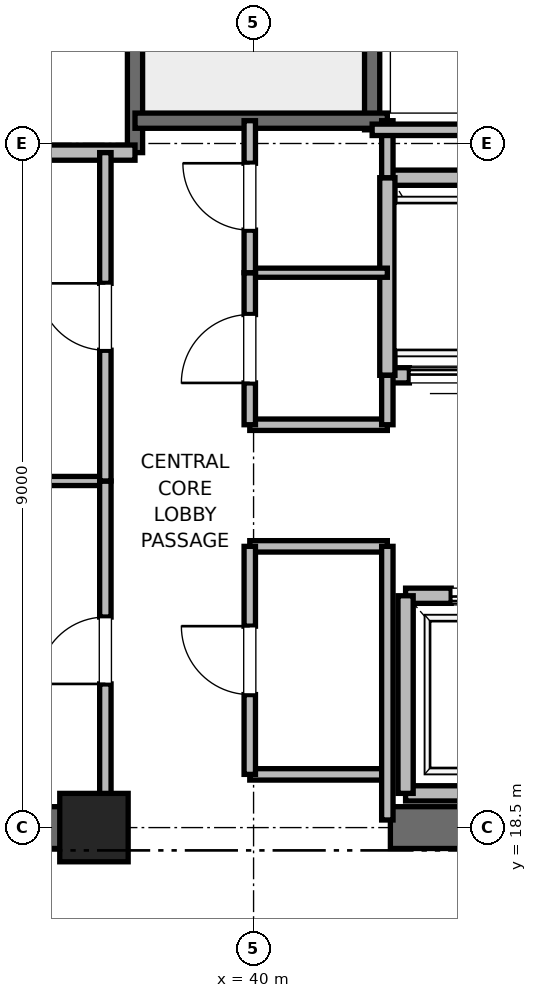
"""IFC4 building model, lengths in metres.
Left out: names, types, materials, properties, quantities, classifications, styles, units other than length and angle.
Written with IfcOpenShell. Run it as: python <this file> out.ifc"""

import sys

from ifc_helpers import new_model, si_unit, direction, frame, frame_2d, origin, origin_2d, place, context, subcontext, project, spatial, rectangle, extrude, element, fill, save


model = new_model("IFC4")
c1 = context("Model", 3, precision=1e-05, world=origin(), true_north=direction((0.0, 1.0)))
c2 = subcontext(c1, "Body", "Model", "MODEL_VIEW")
j1 = project(units=[si_unit("LENGTHUNIT", "METRE"), si_unit("PLANEANGLEUNIT", "RADIAN")], contexts=[c1])
p1 = place(None, origin())
s1 = spatial("IfcSite", under=j1, at=p1, CompositionType="ELEMENT")
p2 = place(p1, origin())
s2 = spatial("IfcBuilding", under=s1, at=p2, CompositionType="ELEMENT")
p3 = place(p2, frame((0.0, 0.0, 189.4)))
s3 = spatial("IfcBuildingStorey", under=s2, at=p3, CompositionType="ELEMENT", Elevation=189.4)
p4 = place(p3, frame((37.9, 18.5, 0.0), z_axis=(0.0, 0.0, 1.0), x_axis=(1.0, 0.0, 0.0)))
e1 = element("IfcColumn", 1, at=p4, inside=s3, PredefinedType="PILASTER", context=c2, shape_type="SweptSolid", body=[
    extrude(rectangle(XDim=0.9, YDim=0.9, at=origin_2d()), origin(), (0.0, 0.0, 1.0), 5.4),
])
for number, where, z_axis, x_axis in (
    (2, (29.0, 18.5, 0.0), (0.0, 0.0, 1.0), (1.0, 0.0, 0.0)),
    (3, (41.8, 18.5, 0.0), (0.0, 0.0, 1.0), (1.0, 0.0, 0.0)),
):
    element("IfcWall", number, at=place(p3, frame(where, z_axis=z_axis, x_axis=x_axis)), inside=s3, PredefinedType="SHEAR", context=c2, shape_type="SweptSolid", body=[
        extrude(rectangle(XDim=9.2, YDim=0.55, at=frame_2d((4.6, 0.0))), origin(), (0.0, 0.0, 1.0), 5.1),
    ])
p5 = place(p3, frame((38.44, 27.38, 0.0), z_axis=(0.0, 0.0, 1.0), x_axis=(0.0, 1.0, 0.0)))
e4 = element("IfcWall", 4, at=p5, inside=s3, PredefinedType="SOLIDWALL", context=c2, shape_type="SweptSolid", body=[
    extrude(rectangle(XDim=8.87, YDim=0.2, at=frame_2d((4.435, 0.0))), origin(), (0.0, 0.0, 1.0), 5.1),
])
p6 = place(p3, frame((41.56, 27.68, 0.0), z_axis=(0.0, 0.0, 1.0), x_axis=(0.0, 1.0, 0.0)))
e5 = element("IfcWall", 5, at=p6, inside=s3, PredefinedType="SOLIDWALL", context=c2, shape_type="SweptSolid", body=[
    extrude(rectangle(XDim=8.57, YDim=0.2, at=frame_2d((4.285, 0.0))), origin(), (0.0, 0.0, 1.0), 5.1),
])
p7 = place(p3, frame((38.44, 27.8, 0.0), z_axis=(0.0, 0.0, 1.0), x_axis=(1.0, 0.0, 0.0)))
e6 = element("IfcWall", 6, at=p7, inside=s3, PredefinedType="SOLIDWALL", context=c2, shape_type="SweptSolid", body=[
    extrude(rectangle(XDim=3.32, YDim=0.2, at=frame_2d((1.66, 0.0))), origin(), (0.0, 0.0, 1.0), 5.1),
])
p8 = place(p3, frame((32.82, 27.38, 0.0), z_axis=(0.0, 0.0, 1.0), x_axis=(1.0, 0.0, 0.0)))
e7 = element("IfcWall", 7, at=p8, inside=s3, PredefinedType="PARTITIONING", context=c2, shape_type="SweptSolid", body=[
    extrude(rectangle(XDim=5.62, YDim=0.2, at=frame_2d((2.81, 0.0))), origin(), (0.0, 0.0, 1.0), 5.1),
])
p9 = place(p3, frame((42.0, 18.95, 0.0), z_axis=(0.0, 0.0, 1.0), x_axis=(1.0, 0.0, 0.0)))
e8 = element("IfcWall", 8, at=p9, inside=s3, PredefinedType="SOLIDWALL", context=c2, shape_type="SweptSolid", body=[
    extrude(rectangle(XDim=2.3, YDim=0.2, at=frame_2d((1.15, 0.0))), origin(), (0.0, 0.0, 1.0), 4.08),
])
p10 = place(p3, frame((44.3, 21.55, 0.0), z_axis=(0.0, 0.0, 1.0), x_axis=(-1.0, 0.0, 0.0)))
e9 = element("IfcWall", 9, at=p10, inside=s3, PredefinedType="SOLIDWALL", context=c2, shape_type="SweptSolid", body=[
    extrude(rectangle(XDim=2.3, YDim=0.2, at=frame_2d((1.15, 0.0))), origin(), (0.0, 0.0, 1.0), 5.1),
])
p11 = place(p10, frame((0.6, 0.0, 0.0)))
e10 = element("IfcOpeningElement", 10, at=p11, cuts=e9, PredefinedType="OPENING", context=c2, shape_type="SweptSolid", body=[
    extrude(rectangle(XDim=1.1, YDim=2.2, at=frame_2d((0.55, 1.1))), frame((0.0, 0.1, 0.0), z_axis=(0.0, -1.0, 0.0), x_axis=(1.0, 0.0, 0.0)), (0.0, 0.0, 1.0), 0.2),
])
p12 = place(p3, frame((42.0, 21.55, 0.0), z_axis=(0.0, 0.0, 1.0), x_axis=(0.0, -1.0, 0.0)))
e11 = element("IfcWall", 11, at=p12, inside=s3, PredefinedType="SOLIDWALL", context=c2, shape_type="SweptSolid", body=[
    extrude(rectangle(XDim=2.6, YDim=0.2, at=frame_2d((1.3, 0.0))), origin(), (0.0, 0.0, 1.0), 4.08),
])
p13 = place(p3, frame((41.76, 24.45, 0.0), z_axis=(0.0, 0.0, 1.0), x_axis=(1.0, 0.0, 0.0)))
e12 = element("IfcWall", 12, at=p13, inside=s3, PredefinedType="SOLIDWALL", context=c2, shape_type="SweptSolid", body=[
    extrude(rectangle(XDim=1.68, YDim=0.2, at=frame_2d((0.84, 0.0))), origin(), (0.0, 0.0, 1.0), 5.1),
])
p14 = place(p13, frame((0.29, 0.0, 0.0)))
e13 = element("IfcOpeningElement", 13, at=p14, cuts=e12, PredefinedType="OPENING", context=c2, shape_type="SweptSolid", body=[
    extrude(rectangle(XDim=1.1, YDim=2.2, at=frame_2d((0.55, 1.1))), frame((0.0, 0.1, 0.0), z_axis=(0.0, -1.0, 0.0), x_axis=(1.0, 0.0, 0.0)), (0.0, 0.0, 1.0), 0.2),
])
p15 = place(p3, frame((43.44, 27.05, 0.0), z_axis=(0.0, 0.0, 1.0), x_axis=(-1.0, 0.0, 0.0)))
e14 = element("IfcWall", 14, at=p15, inside=s3, PredefinedType="SOLIDWALL", context=c2, shape_type="SweptSolid", body=[
    extrude(rectangle(XDim=1.68, YDim=0.2, at=frame_2d((0.84, 0.0))), origin(), (0.0, 0.0, 1.0), 5.1),
])
p16 = place(p3, frame((41.76, 27.05, 0.0), z_axis=(0.0, 0.0, 1.0), x_axis=(0.0, -1.0, 0.0)))
e15 = element("IfcWall", 15, at=p16, inside=s3, PredefinedType="SOLIDWALL", context=c2, shape_type="SweptSolid", body=[
    extrude(rectangle(XDim=2.6, YDim=0.2, at=frame_2d((1.3, 0.0))), origin(), (0.0, 0.0, 1.0), 5.1),
])
for number, where, z_axis, x_axis in (
    (16, (39.95, 19.2, 0.0), (0.0, 0.0, 1.0), (1.0, 0.0, 0.0)),
    (17, (39.95, 22.2, 0.0), (0.0, 0.0, 1.0), (1.0, 0.0, 0.0)),
    (18, (39.95, 23.8, 0.0), (0.0, 0.0, 1.0), (1.0, 0.0, 0.0)),
):
    element("IfcWall", number, at=place(p3, frame(where, z_axis=z_axis, x_axis=x_axis)), inside=s3, PredefinedType="PARTITIONING", context=c2, shape_type="SweptSolid", body=[
        extrude(rectangle(XDim=1.81, YDim=0.15, at=frame_2d((0.905, 0.0))), origin(), (0.0, 0.0, 1.0), 2.85),
    ])
p17 = place(p3, frame((39.95, 25.8, 0.0), z_axis=(0.0, 0.0, 1.0), x_axis=(1.0, 0.0, 0.0)))
e19 = element("IfcWall", 19, at=p17, inside=s3, PredefinedType="PARTITIONING", context=c2, shape_type="SweptSolid", body=[
    extrude(rectangle(XDim=1.81, YDim=0.12, at=frame_2d((0.905, 0.0))), origin(), (0.0, 0.0, 1.0), 2.85),
])
p18 = place(p3, frame((41.76, 18.6, 0.0), z_axis=(0.0, 0.0, 1.0), x_axis=(0.0, 1.0, 0.0)))
e20 = element("IfcWall", 20, at=p18, inside=s3, PredefinedType="PARTITIONING", context=c2, shape_type="SweptSolid", body=[
    extrude(rectangle(XDim=3.6, YDim=0.15, at=frame_2d((1.8, 0.0))), origin(), (0.0, 0.0, 1.0), 2.85),
])
p19 = place(p3, frame((41.76, 23.8, 0.0), z_axis=(0.0, 0.0, 1.0), x_axis=(0.0, 1.0, 0.0)))
e21 = element("IfcWall", 21, at=p19, inside=s3, PredefinedType="PARTITIONING", context=c2, shape_type="SweptSolid", body=[
    extrude(rectangle(XDim=0.65, YDim=0.15, at=frame_2d((0.325, 0.0))), origin(), (0.0, 0.0, 1.0), 2.85),
])
p20 = place(p3, frame((41.76, 27.05, 0.0), z_axis=(0.0, 0.0, 1.0), x_axis=(0.0, 1.0, 0.0)))
e22 = element("IfcWall", 22, at=p20, inside=s3, PredefinedType="PARTITIONING", context=c2, shape_type="SweptSolid", body=[
    extrude(rectangle(XDim=0.75, YDim=0.15, at=frame_2d((0.375, 0.0))), origin(), (0.0, 0.0, 1.0), 2.85),
])
p21 = place(p3, frame((39.95, 19.2, 0.0), z_axis=(0.0, 0.0, 1.0), x_axis=(0.0, 1.0, 0.0)))
e23 = element("IfcWall", 23, at=p21, inside=s3, PredefinedType="PARTITIONING", context=c2, shape_type="SweptSolid", body=[
    extrude(rectangle(XDim=3.0, YDim=0.15, at=frame_2d((1.5, 0.0))), origin(), (0.0, 0.0, 1.0), 2.85),
])
p22 = place(p21, frame((1.05, 0.0, 0.0)))
e24 = element("IfcOpeningElement", 24, at=p22, cuts=e23, PredefinedType="OPENING", context=c2, shape_type="SweptSolid", body=[
    extrude(rectangle(XDim=0.9, YDim=2.1, at=frame_2d((0.45, 1.05))), frame((0.0, 0.075, 0.0), z_axis=(0.0, -1.0, 0.0), x_axis=(1.0, 0.0, 0.0)), (0.0, 0.0, 1.0), 0.15),
])
p23 = place(p3, frame((39.95, 23.8, 0.0), z_axis=(0.0, 0.0, 1.0), x_axis=(0.0, 1.0, 0.0)))
e25 = element("IfcWall", 25, at=p23, inside=s3, PredefinedType="PARTITIONING", context=c2, shape_type="SweptSolid", body=[
    extrude(rectangle(XDim=2.0, YDim=0.15, at=frame_2d((1.0, 0.0))), origin(), (0.0, 0.0, 1.0), 2.85),
])
p24 = place(p23, frame((0.55, 0.0, 0.0)))
e26 = element("IfcOpeningElement", 26, at=p24, cuts=e25, PredefinedType="OPENING", context=c2, shape_type="SweptSolid", body=[
    extrude(rectangle(XDim=0.9, YDim=2.1, at=frame_2d((0.45, 1.05))), frame((0.0, 0.075, 0.0), z_axis=(0.0, -1.0, 0.0), x_axis=(1.0, 0.0, 0.0)), (0.0, 0.0, 1.0), 0.15),
])
p25 = place(p3, frame((39.95, 25.8, 0.0), z_axis=(0.0, 0.0, 1.0), x_axis=(0.0, 1.0, 0.0)))
e27 = element("IfcWall", 27, at=p25, inside=s3, PredefinedType="PARTITIONING", context=c2, shape_type="SweptSolid", body=[
    extrude(rectangle(XDim=2.0, YDim=0.15, at=frame_2d((1.0, 0.0))), origin(), (0.0, 0.0, 1.0), 2.85),
])
p26 = place(p25, frame((0.56, 0.0, 0.0)))
e28 = element("IfcOpeningElement", 28, at=p26, cuts=e27, PredefinedType="OPENING", context=c2, shape_type="SweptSolid", body=[
    extrude(rectangle(XDim=0.88, YDim=2.1, at=frame_2d((0.44, 1.05))), frame((0.0, 0.075, 0.0), z_axis=(0.0, -1.0, 0.0), x_axis=(1.0, 0.0, 0.0)), (0.0, 0.0, 1.0), 0.15),
])
p27 = place(p3, frame((32.82, 23.06, 0.0), z_axis=(0.0, 0.0, 1.0), x_axis=(1.0, 0.0, 0.0)))
e29 = element("IfcWall", 29, at=p27, inside=s3, PredefinedType="PARTITIONING", context=c2, shape_type="SweptSolid", body=[
    extrude(rectangle(XDim=5.23, YDim=0.12, at=frame_2d((2.615, 0.0))), origin(), (0.0, 0.0, 1.0), 2.85),
])
p28 = place(p3, frame((38.05, 18.6, 0.0), z_axis=(0.0, 0.0, 1.0), x_axis=(0.0, 1.0, 0.0)))
e30 = element("IfcWall", 30, at=p28, inside=s3, PredefinedType="PARTITIONING", context=c2, shape_type="SweptSolid", body=[
    extrude(rectangle(XDim=4.46, YDim=0.15, at=frame_2d((2.23, 0.0))), origin(), (0.0, 0.0, 1.0), 2.85),
])
p29 = place(p28, frame((1.79, 0.0, 0.0)))
e31 = element("IfcOpeningElement", 31, at=p29, cuts=e30, PredefinedType="OPENING", context=c2, shape_type="SweptSolid", body=[
    extrude(rectangle(XDim=0.88, YDim=2.1, at=frame_2d((0.44, 1.05))), frame((0.0, 0.075, 0.0), z_axis=(0.0, -1.0, 0.0), x_axis=(1.0, 0.0, 0.0)), (0.0, 0.0, 1.0), 0.15),
])
p30 = place(p3, frame((38.05, 23.06, 0.0), z_axis=(0.0, 0.0, 1.0), x_axis=(0.0, 1.0, 0.0)))
e32 = element("IfcWall", 32, at=p30, inside=s3, PredefinedType="PARTITIONING", context=c2, shape_type="SweptSolid", body=[
    extrude(rectangle(XDim=4.32, YDim=0.15, at=frame_2d((2.16, 0.0))), origin(), (0.0, 0.0, 1.0), 2.85),
])
p31 = place(p30, frame((1.72, 0.0, 0.0)))
e33 = element("IfcOpeningElement", 33, at=p31, cuts=e32, PredefinedType="OPENING", context=c2, shape_type="SweptSolid", body=[
    extrude(rectangle(XDim=0.88, YDim=2.1, at=frame_2d((0.44, 1.05))), frame((0.0, 0.075, 0.0), z_axis=(0.0, -1.0, 0.0), x_axis=(1.0, 0.0, 0.0)), (0.0, 0.0, 1.0), 0.15),
])
p32 = place(p3, frame((41.56, 27.68, 0.0), z_axis=(0.0, 0.0, 1.0), x_axis=(1.0, 0.0, 0.0)))
e34 = element("IfcWall", 34, at=p32, inside=s3, PredefinedType="PARTITIONING", context=c2, shape_type="SweptSolid", body=[
    extrude(rectangle(XDim=3.59, YDim=0.15, at=frame_2d((1.795, 0.0))), origin(), (0.0, 0.0, 1.0), 2.85),
])
p33 = place(p11, origin())
e35 = element("IfcDoor", 35, at=p33, inside=s3, OperationType="SLIDING_TO_RIGHT", PredefinedType="DOOR", context=c2, shape_type="SweptSolid", body=[
    extrude(rectangle(XDim=1.1, YDim=2.2, at=frame_2d((0.55, 1.1))), frame((0.0, 0.025, 0.0), z_axis=(0.0, -1.0, 0.0), x_axis=(1.0, 0.0, 0.0)), (0.0, 0.0, 1.0), 0.05),
])
fill(e10, e35)
p34 = place(p14, origin())
e36 = element("IfcDoor", 36, at=p34, inside=s3, OperationType="SLIDING_TO_RIGHT", PredefinedType="DOOR", context=c2, shape_type="SweptSolid", body=[
    extrude(rectangle(XDim=1.1, YDim=2.2, at=frame_2d((0.55, 1.1))), frame((0.0, 0.025, 0.0), z_axis=(0.0, -1.0, 0.0), x_axis=(1.0, 0.0, 0.0)), (0.0, 0.0, 1.0), 0.05),
])
fill(e13, e36)
p35 = place(p22, origin())
e37 = element("IfcDoor", 37, at=p35, inside=s3, OperationType="SINGLE_SWING_RIGHT", PredefinedType="DOOR", context=c2, shape_type="SweptSolid", body=[
    extrude(rectangle(XDim=0.9, YDim=2.1, at=frame_2d((0.45, 1.05))), frame((0.0, 0.025, 0.0), z_axis=(0.0, -1.0, 0.0), x_axis=(1.0, 0.0, 0.0)), (0.0, 0.0, 1.0), 0.05),
])
fill(e24, e37)
p36 = place(p24, origin())
e38 = element("IfcDoor", 38, at=p36, inside=s3, OperationType="SINGLE_SWING_LEFT", PredefinedType="DOOR", context=c2, shape_type="SweptSolid", body=[
    extrude(rectangle(XDim=0.9, YDim=2.1, at=frame_2d((0.45, 1.05))), frame((0.0, 0.025, 0.0), z_axis=(0.0, -1.0, 0.0), x_axis=(1.0, 0.0, 0.0)), (0.0, 0.0, 1.0), 0.05),
])
fill(e26, e38)
p37 = place(p26, origin())
e39 = element("IfcDoor", 39, at=p37, inside=s3, OperationType="SINGLE_SWING_RIGHT", PredefinedType="DOOR", context=c2, shape_type="SweptSolid", body=[
    extrude(rectangle(XDim=0.88, YDim=2.1, at=frame_2d((0.44, 1.05))), frame((0.0, 0.025, 0.0), z_axis=(0.0, -1.0, 0.0), x_axis=(1.0, 0.0, 0.0)), (0.0, 0.0, 1.0), 0.05),
])
fill(e28, e39)
p38 = place(p29, origin())
e40 = element("IfcDoor", 40, at=p38, inside=s3, OperationType="SINGLE_SWING_LEFT", PredefinedType="DOOR", context=c2, shape_type="SweptSolid", body=[
    extrude(rectangle(XDim=0.88, YDim=2.1, at=frame_2d((0.44, 1.05))), frame((0.0, 0.025, 0.0), z_axis=(0.0, -1.0, 0.0), x_axis=(1.0, 0.0, 0.0)), (0.0, 0.0, 1.0), 0.05),
])
fill(e31, e40)
p39 = place(p31, origin())
e41 = element("IfcDoor", 41, at=p39, inside=s3, OperationType="SINGLE_SWING_RIGHT", PredefinedType="DOOR", context=c2, shape_type="SweptSolid", body=[
    extrude(rectangle(XDim=0.88, YDim=2.1, at=frame_2d((0.44, 1.05))), frame((0.0, 0.025, 0.0), z_axis=(0.0, -1.0, 0.0), x_axis=(1.0, 0.0, 0.0)), (0.0, 0.0, 1.0), 0.05),
])
fill(e33, e41)
save(model, sys.argv[1])
